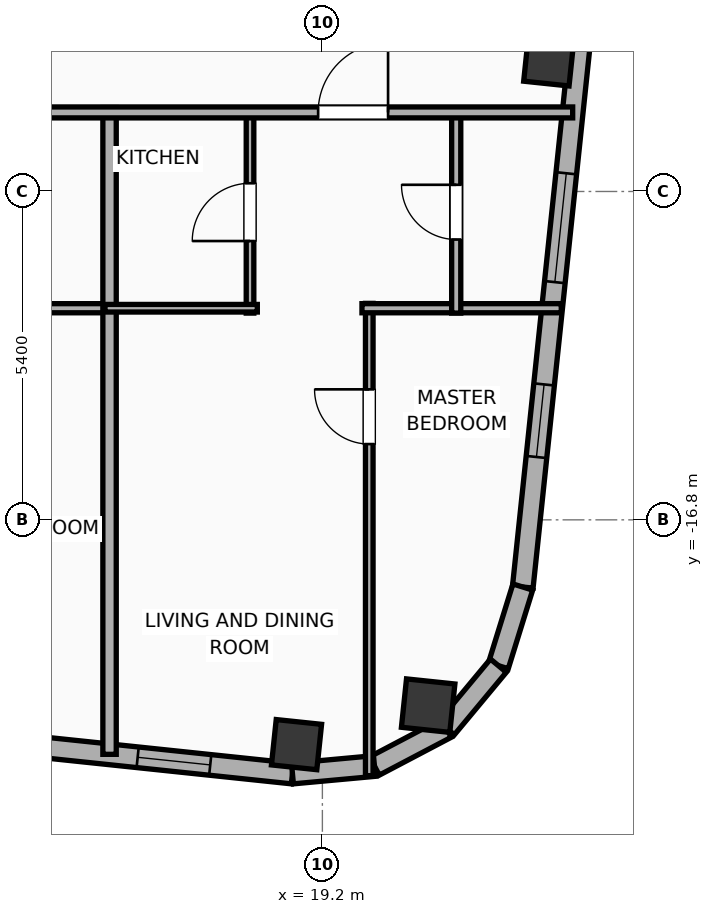
"""IFC4 building model, lengths in metres.
Left out: names, types, materials, properties, quantities, classifications, styles, units other than length and angle.
Written with IfcOpenShell. Run it as: python <this file> out.ifc"""

import sys

from ifc_helpers import new_model, si_unit, direction, frame, frame_2d, origin, origin_2d, place, context, subcontext, project, spatial, rectangle, hollow_rectangle, hollow_circle, extrude, element, fill, save


model = new_model("IFC4")
c1 = context("Model", 3, precision=1e-05, world=origin(), true_north=direction((0.0, 1.0)))
c2 = subcontext(c1, "Body", "Model", "MODEL_VIEW")
j1 = project(units=[si_unit("LENGTHUNIT", "METRE"), si_unit("PLANEANGLEUNIT", "RADIAN")], contexts=[c1])
p1 = place(None, origin())
s1 = spatial("IfcSite", under=j1, at=p1, CompositionType="ELEMENT")
p2 = place(p1, origin())
s2 = spatial("IfcBuilding", under=s1, at=p2, CompositionType="ELEMENT")
p3 = place(p2, frame((0.0, 0.0, 260.0)))
s3 = spatial("IfcBuildingStorey", under=s2, at=p3, CompositionType="ELEMENT", Elevation=260.0)
p4 = place(p3, frame((18.775, -20.497, 0.0), z_axis=(0.0, 0.0, 1.0), x_axis=(0.994521895368, -0.104528463268, 0.0)))
e1 = element("IfcColumn", 1, at=p4, inside=s3, PredefinedType="COLUMN", context=c2, shape_type="SweptSolid", body=[
    extrude(hollow_rectangle(XDim=0.75, YDim=0.75, WallThickness=0.025, at=origin_2d()), origin(), (0.0, 0.0, 1.0), 3.9),
])
p5 = place(p3, frame((20.939, -19.855, 0.0), z_axis=(0.0, 0.0, 1.0), x_axis=(0.994521895368, -0.104528463268, 0.0)))
e2 = element("IfcColumn", 2, at=p5, inside=s3, PredefinedType="COLUMN", context=c2, shape_type="SweptSolid", body=[
    extrude(hollow_circle(Radius=0.4, WallThickness=0.028, at=origin_2d()), origin(), (0.0, 0.0, 1.0), 3.9),
])
p6 = place(p3, frame((22.923, -9.252, 0.0), z_axis=(0.0, 0.0, 1.0), x_axis=(0.994521895368, -0.104528463268, 0.0)))
e3 = element("IfcColumn", 3, at=p6, inside=s3, PredefinedType="COLUMN", context=c2, shape_type="SweptSolid", body=[
    extrude(hollow_rectangle(XDim=0.75, YDim=0.75, WallThickness=0.025, at=origin_2d()), origin(), (0.0, 0.0, 1.0), 3.9),
])
p7 = place(p3, frame((18.708, -20.972, 0.0), z_axis=(0.0, 0.0, 1.0), x_axis=(-0.994521888554, 0.104528528102, 0.0)))
e4 = element("IfcWall", 4, at=p7, inside=s3, PredefinedType="ELEMENTEDWALL", context=c2, shape_type="SweptSolid", body=[
    extrude(rectangle(XDim=46.766, YDim=0.34, at=frame_2d((23.383, 0.0))), origin(), (0.0, 0.0, 1.0), 2.54),
])
p8 = place(p7, frame((23.833, 0.0, 0.75)))
e5 = element("IfcOpeningElement", 5, at=p8, cuts=e4, PredefinedType="OPENING", context=c2, shape_type="SweptSolid", body=[
    extrude(rectangle(XDim=2.4, YDim=1.63, at=frame_2d((1.2, 0.815))), frame((0.0, 0.18, 0.0), z_axis=(0.0, -1.0, 0.0), x_axis=(1.0, 0.0, 0.0)), (0.0, 0.0, 1.0), 0.36),
])
p9 = place(p7, frame((38.622, 0.0, 0.75)))
e6 = element("IfcOpeningElement", 6, at=p9, cuts=e4, PredefinedType="OPENING", context=c2, shape_type="SweptSolid", body=[
    extrude(rectangle(XDim=2.4, YDim=1.63, at=frame_2d((1.2, 0.815))), frame((0.0, 0.18, 0.0), z_axis=(0.0, -1.0, 0.0), x_axis=(1.0, 0.0, 0.0)), (0.0, 0.0, 1.0), 0.36),
])
p10 = place(p7, frame((44.402, 0.0, 0.75)))
e7 = element("IfcOpeningElement", 7, at=p10, cuts=e4, PredefinedType="OPENING", context=c2, shape_type="SweptSolid", body=[
    extrude(rectangle(XDim=1.2, YDim=1.63, at=frame_2d((0.6, 0.815))), frame((0.0, 0.18, 0.0), z_axis=(0.0, -1.0, 0.0), x_axis=(1.0, 0.0, 0.0)), (0.0, 0.0, 1.0), 0.36),
])
p11 = place(p7, frame((42.406, 0.0, 0.75)))
e8 = element("IfcOpeningElement", 8, at=p11, cuts=e4, PredefinedType="OPENING", context=c2, shape_type="SweptSolid", body=[
    extrude(rectangle(XDim=1.2, YDim=1.63, at=frame_2d((0.6, 0.815))), frame((0.0, 0.18, 0.0), z_axis=(0.0, -1.0, 0.0), x_axis=(1.0, 0.0, 0.0)), (0.0, 0.0, 1.0), 0.36),
])
p12 = place(p7, frame((34.933, 0.0, 0.75)))
e9 = element("IfcOpeningElement", 9, at=p12, cuts=e4, PredefinedType="OPENING", context=c2, shape_type="SweptSolid", body=[
    extrude(rectangle(XDim=1.2, YDim=1.63, at=frame_2d((0.6, 0.815))), frame((0.0, 0.18, 0.0), z_axis=(0.0, -1.0, 0.0), x_axis=(1.0, 0.0, 0.0)), (0.0, 0.0, 1.0), 0.36),
])
p13 = place(p7, frame((28.631, 0.0, 0.75)))
e10 = element("IfcOpeningElement", 10, at=p13, cuts=e4, PredefinedType="OPENING", context=c2, shape_type="SweptSolid", body=[
    extrude(rectangle(XDim=1.2, YDim=1.63, at=frame_2d((0.6, 0.815))), frame((0.0, 0.18, 0.0), z_axis=(0.0, -1.0, 0.0), x_axis=(1.0, 0.0, 0.0)), (0.0, 0.0, 1.0), 0.36),
])
p14 = place(p7, frame((30.896, 0.0, 0.75)))
e11 = element("IfcOpeningElement", 11, at=p14, cuts=e4, PredefinedType="OPENING", context=c2, shape_type="SweptSolid", body=[
    extrude(rectangle(XDim=1.2, YDim=1.63, at=frame_2d((0.6, 0.815))), frame((0.0, 0.18, 0.0), z_axis=(0.0, -1.0, 0.0), x_axis=(1.0, 0.0, 0.0)), (0.0, 0.0, 1.0), 0.36),
])
p15 = place(p7, frame((7.492, 0.0, 0.75)))
e12 = element("IfcOpeningElement", 12, at=p15, cuts=e4, PredefinedType="OPENING", context=c2, shape_type="SweptSolid", body=[
    extrude(rectangle(XDim=1.2, YDim=1.63, at=frame_2d((0.6, 0.815))), frame((0.0, 0.18, 0.0), z_axis=(0.0, -1.0, 0.0), x_axis=(1.0, 0.0, 0.0)), (0.0, 0.0, 1.0), 0.36),
])
p16 = place(p7, frame((4.141, 0.0, 0.75)))
e13 = element("IfcOpeningElement", 13, at=p16, cuts=e4, PredefinedType="OPENING", context=c2, shape_type="SweptSolid", body=[
    extrude(rectangle(XDim=1.2, YDim=1.63, at=frame_2d((0.6, 0.815))), frame((0.0, 0.18, 0.0), z_axis=(0.0, -1.0, 0.0), x_axis=(1.0, 0.0, 0.0)), (0.0, 0.0, 1.0), 0.36),
])
p17 = place(p7, frame((1.36, 0.0, 0.75)))
e14 = element("IfcOpeningElement", 14, at=p17, cuts=e4, PredefinedType="OPENING", context=c2, shape_type="SweptSolid", body=[
    extrude(rectangle(XDim=1.2, YDim=1.63, at=frame_2d((0.6, 0.815))), frame((0.0, 0.18, 0.0), z_axis=(0.0, -1.0, 0.0), x_axis=(1.0, 0.0, 0.0)), (0.0, 0.0, 1.0), 0.36),
])
p18 = place(p7, frame((20.254, 0.0, 0.75)))
e15 = element("IfcOpeningElement", 15, at=p18, cuts=e4, PredefinedType="OPENING", context=c2, shape_type="SweptSolid", body=[
    extrude(rectangle(XDim=1.2, YDim=1.63, at=frame_2d((0.6, 0.815))), frame((0.0, 0.18, 0.0), z_axis=(0.0, -1.0, 0.0), x_axis=(1.0, 0.0, 0.0)), (0.0, 0.0, 1.0), 0.36),
])
p19 = place(p7, frame((16.172, 0.0, 0.75)))
e16 = element("IfcOpeningElement", 16, at=p19, cuts=e4, PredefinedType="OPENING", context=c2, shape_type="SweptSolid", body=[
    extrude(rectangle(XDim=1.2, YDim=1.63, at=frame_2d((0.6, 0.815))), frame((0.0, 0.18, 0.0), z_axis=(0.0, -1.0, 0.0), x_axis=(1.0, 0.0, 0.0)), (0.0, 0.0, 1.0), 0.36),
])
p20 = place(p7, frame((12.11, 0.0, 0.75)))
e17 = element("IfcOpeningElement", 17, at=p20, cuts=e4, PredefinedType="OPENING", context=c2, shape_type="SweptSolid", body=[
    extrude(rectangle(XDim=1.2, YDim=1.63, at=frame_2d((0.6, 0.815))), frame((0.0, 0.18, 0.0), z_axis=(0.0, -1.0, 0.0), x_axis=(1.0, 0.0, 0.0)), (0.0, 0.0, 1.0), 0.36),
])
p21 = place(p3, frame((25.67, 12.296, 0.0), z_axis=(0.0, 0.0, 1.0), x_axis=(-0.104533282919, -0.994521388791, 0.0)))
e18 = element("IfcWall", 18, at=p21, inside=s3, PredefinedType="ELEMENTEDWALL", context=c2, shape_type="SweptSolid", body=[
    extrude(rectangle(XDim=30.366, YDim=0.34, at=frame_2d((15.183, 0.0))), origin(), (0.0, 0.0, 1.0), 2.54),
])
p22 = place(p21, frame((5.842, 0.0, 0.75)))
e19 = element("IfcOpeningElement", 19, at=p22, cuts=e18, PredefinedType="OPENING", context=c2, shape_type="SweptSolid", body=[
    extrude(rectangle(XDim=1.8, YDim=1.63, at=frame_2d((0.9, 0.815))), frame((0.0, 0.18, 0.0), z_axis=(0.0, -1.0, 0.0), x_axis=(1.0, 0.0, 0.0)), (0.0, 0.0, 1.0), 0.36),
])
p23 = place(p21, frame((23.525, 0.0, 0.75)))
e20 = element("IfcOpeningElement", 20, at=p23, cuts=e18, PredefinedType="OPENING", context=c2, shape_type="SweptSolid", body=[
    extrude(rectangle(XDim=1.8, YDim=1.63, at=frame_2d((0.9, 0.815))), frame((0.0, 0.18, 0.0), z_axis=(0.0, -1.0, 0.0), x_axis=(1.0, 0.0, 0.0)), (0.0, 0.0, 1.0), 0.36),
])
p24 = place(p21, frame((27.017, 0.0, 0.75)))
e21 = element("IfcOpeningElement", 21, at=p24, cuts=e18, PredefinedType="OPENING", context=c2, shape_type="SweptSolid", body=[
    extrude(rectangle(XDim=1.2, YDim=1.63, at=frame_2d((0.6, 0.815))), frame((0.0, 0.18, 0.0), z_axis=(0.0, -1.0, 0.0), x_axis=(1.0, 0.0, 0.0)), (0.0, 0.0, 1.0), 0.36),
])
p25 = place(p21, frame((17.829, 0.0, 0.75)))
e22 = element("IfcOpeningElement", 22, at=p25, cuts=e18, PredefinedType="OPENING", context=c2, shape_type="SweptSolid", body=[
    extrude(rectangle(XDim=1.2, YDim=1.63, at=frame_2d((0.6, 0.815))), frame((0.0, 0.18, 0.0), z_axis=(0.0, -1.0, 0.0), x_axis=(1.0, 0.0, 0.0)), (0.0, 0.0, 1.0), 0.36),
])
p26 = place(p3, frame((22.496, -17.905, 0.0), z_axis=(0.0, 0.0, 1.0), x_axis=(-0.296416228123, -0.955058856671, 0.0)))
e23 = element("IfcWall", 23, at=p26, inside=s3, PredefinedType="ELEMENTEDWALL", context=c2, shape_type="SweptSolid", body=[
    extrude(rectangle(XDim=1.354, YDim=0.34, at=frame_2d((0.677, 0.0))), origin(), (0.0, 0.0, 1.0), 3.65),
])
p27 = place(p3, frame((22.094, -19.198, 0.0), z_axis=(0.0, 0.0, 1.0), x_axis=(-0.639501603217, -0.768789762863, 0.0)))
e24 = element("IfcWall", 24, at=p27, inside=s3, PredefinedType="ELEMENTEDWALL", context=c2, shape_type="SweptSolid", body=[
    extrude(rectangle(XDim=1.337, YDim=0.34, at=frame_2d((0.668, 0.0))), origin(), (0.0, 0.0, 1.0), 3.65),
])
p28 = place(p3, frame((21.24, -20.226, 0.0), z_axis=(0.0, 0.0, 1.0), x_axis=(-0.884922182678, -0.465738908193, 0.0)))
e25 = element("IfcWall", 25, at=p28, inside=s3, PredefinedType="ELEMENTEDWALL", context=c2, shape_type="SweptSolid", body=[
    extrude(rectangle(XDim=1.337, YDim=0.34, at=frame_2d((0.668, 0.0))), origin(), (0.0, 0.0, 1.0), 2.54),
])
p29 = place(p3, frame((20.056, -20.848, 0.0), z_axis=(0.0, 0.0, 1.0), x_axis=(-0.995813013343, -0.091413579172, 0.0)))
e26 = element("IfcWall", 26, at=p29, inside=s3, PredefinedType="ELEMENTEDWALL", context=c2, shape_type="SweptSolid", body=[
    extrude(rectangle(XDim=1.354, YDim=0.34, at=frame_2d((0.677, 0.0))), origin(), (0.0, 0.0, 1.0), 2.54),
])
p30 = place(p3, frame((12.17, -13.32, 0.0), z_axis=(0.0, 0.0, 1.0), x_axis=(1.0, 0.0, 0.0)))
e27 = element("IfcWall", 27, at=p30, inside=s3, PredefinedType="PLUMBINGWALL", context=c2, shape_type="SweptSolid", body=[
    extrude(rectangle(XDim=3.605, YDim=0.15, at=frame_2d((1.802, 0.0))), origin(), (0.0, 0.0, 1.0), 3.65),
])
p31 = place(p3, frame((15.7, -20.656, 0.0), z_axis=(0.0, 0.0, 1.0), x_axis=(0.0, 1.0, 0.0)))
e28 = element("IfcWall", 28, at=p31, inside=s3, PredefinedType="PARTITIONING", context=c2, shape_type="SweptSolid", body=[
    extrude(rectangle(XDim=10.636, YDim=0.22, at=frame_2d((5.318, 0.0))), origin(), (0.0, 0.0, 1.0), 3.65),
])
p32 = place(p3, frame((19.971, -21.007, 0.0), z_axis=(0.0, 0.0, 1.0), x_axis=(0.0, 1.0, 0.0)))
e29 = element("IfcWall", 29, at=p32, inside=s3, PredefinedType="PARTITIONING", context=c2, shape_type="SweptSolid", body=[
    extrude(rectangle(XDim=7.767, YDim=0.125, at=frame_2d((3.883, 0.0))), origin(), (0.0, 0.0, 1.0), 3.65),
])
p33 = place(p32, frame((5.453, 0.0, 0.0)))
e30 = element("IfcOpeningElement", 30, at=p33, cuts=e29, PredefinedType="OPENING", context=c2, shape_type="SweptSolid", body=[
    extrude(rectangle(XDim=0.9, YDim=2.05, at=frame_2d((0.45, 1.025))), frame((0.0, 0.073, 0.0), z_axis=(0.0, -1.0, 0.0), x_axis=(1.0, 0.0, 0.0)), (0.0, 0.0, 1.0), 0.145),
])
p34 = place(p3, frame((19.851, -13.32, 0.0), z_axis=(0.0, 0.0, 1.0), x_axis=(1.0, 0.0, 0.0)))
e31 = element("IfcWall", 31, at=p34, inside=s3, PredefinedType="PLUMBINGWALL", context=c2, shape_type="SweptSolid", body=[
    extrude(rectangle(XDim=3.278, YDim=0.15, at=frame_2d((1.639, 0.0))), origin(), (0.0, 0.0, 1.0), 3.65),
])
p35 = place(p3, frame((18.01, -13.4, 0.0), z_axis=(0.0, 0.0, 1.0), x_axis=(0.0, 1.0, 0.0)))
e32 = element("IfcWall", 32, at=p35, inside=s3, PredefinedType="PARTITIONING", context=c2, shape_type="SweptSolid", body=[
    extrude(rectangle(XDim=3.32, YDim=0.125, at=frame_2d((1.66, 0.0))), origin(), (0.0, 0.0, 1.0), 3.65),
])
p36 = place(p35, frame((1.185, 0.0, 0.0)))
e33 = element("IfcOpeningElement", 33, at=p36, cuts=e32, PredefinedType="OPENING", context=c2, shape_type="SweptSolid", body=[
    extrude(rectangle(XDim=0.95, YDim=2.05, at=frame_2d((0.475, 1.025))), frame((0.0, 0.073, 0.0), z_axis=(0.0, -1.0, 0.0), x_axis=(1.0, 0.0, 0.0)), (0.0, 0.0, 1.0), 0.145),
])
p37 = place(p3, frame((15.625, -13.32, 0.0), z_axis=(0.0, 0.0, 1.0), x_axis=(1.0, 0.0, 0.0)))
e34 = element("IfcWall", 34, at=p37, inside=s3, PredefinedType="PARTITIONING", context=c2, shape_type="SweptSolid", body=[
    extrude(rectangle(XDim=2.505, YDim=0.125, at=frame_2d((1.252, 0.0))), origin(), (0.0, 0.0, 1.0), 3.65),
])
p38 = place(p3, frame((21.401, -13.4, 0.0), z_axis=(0.0, 0.0, 1.0), x_axis=(0.0, 1.0, 0.0)))
e35 = element("IfcWall", 35, at=p38, inside=s3, PredefinedType="PLUMBINGWALL", context=c2, shape_type="SweptSolid", body=[
    extrude(rectangle(XDim=3.32, YDim=0.15, at=frame_2d((1.66, 0.0))), origin(), (0.0, 0.0, 1.0), 3.65),
])
p39 = place(p38, frame((1.21, 0.0, 0.0)))
e36 = element("IfcOpeningElement", 36, at=p39, cuts=e35, PredefinedType="OPENING", context=c2, shape_type="SweptSolid", body=[
    extrude(rectangle(XDim=0.9, YDim=2.05, at=frame_2d((0.45, 1.025))), frame((0.0, 0.085, 0.0), z_axis=(0.0, -1.0, 0.0), x_axis=(1.0, 0.0, 0.0)), (0.0, 0.0, 1.0), 0.17),
])
p40 = place(p3, frame((8.08, -10.1, 0.0), z_axis=(0.0, 0.0, 1.0), x_axis=(1.0, 0.0, 0.0)))
e37 = element("IfcWall", 37, at=p40, inside=s3, PredefinedType="PARTITIONING", context=c2, shape_type="SweptSolid", body=[
    extrude(rectangle(XDim=15.236, YDim=0.18, at=frame_2d((7.618, 0.0))), origin(), (0.0, 0.0, 1.0), 3.65),
])
p41 = place(p40, frame((3.4, 0.0, 0.0)))
e38 = element("IfcOpeningElement", 38, at=p41, cuts=e37, PredefinedType="OPENING", context=c2, shape_type="SweptSolid", body=[
    extrude(rectangle(XDim=1.15, YDim=2.05, at=frame_2d((0.575, 1.025))), frame((0.0, 0.1, 0.0), z_axis=(0.0, -1.0, 0.0), x_axis=(1.0, 0.0, 0.0)), (0.0, 0.0, 1.0), 0.2),
])
p42 = place(p40, frame((11.05, 0.0, 0.0)))
e39 = element("IfcOpeningElement", 39, at=p42, cuts=e37, PredefinedType="OPENING", context=c2, shape_type="SweptSolid", body=[
    extrude(rectangle(XDim=1.15, YDim=2.05, at=frame_2d((0.575, 1.025))), frame((0.0, 0.1, 0.0), z_axis=(0.0, -1.0, 0.0), x_axis=(1.0, 0.0, 0.0)), (0.0, 0.0, 1.0), 0.2),
])
p43 = place(p23, origin())
e40 = element("IfcWindow", 40, at=p43, inside=s3, PartitioningType="SINGLE_PANEL", PredefinedType="WINDOW", context=c2, shape_type="SweptSolid", body=[
    extrude(rectangle(XDim=1.8, YDim=1.63, at=frame_2d((0.9, 0.815))), frame((0.0, 0.03, 0.0), z_axis=(0.0, -1.0, 0.0), x_axis=(1.0, 0.0, 0.0)), (0.0, 0.0, 1.0), 0.06),
])
fill(e20, e40)
p44 = place(p17, origin())
e41 = element("IfcWindow", 41, at=p44, inside=s3, PartitioningType="SINGLE_PANEL", PredefinedType="WINDOW", context=c2, shape_type="SweptSolid", body=[
    extrude(rectangle(XDim=1.2, YDim=1.63, at=frame_2d((0.6, 0.815))), frame((0.0, 0.03, 0.0), z_axis=(0.0, -1.0, 0.0), x_axis=(1.0, 0.0, 0.0)), (0.0, 0.0, 1.0), 0.06),
])
fill(e14, e41)
p45 = place(p24, origin())
e42 = element("IfcWindow", 42, at=p45, inside=s3, PartitioningType="SINGLE_PANEL", PredefinedType="WINDOW", context=c2, shape_type="SweptSolid", body=[
    extrude(rectangle(XDim=1.2, YDim=1.63, at=frame_2d((0.6, 0.815))), frame((0.0, 0.03, 0.0), z_axis=(0.0, -1.0, 0.0), x_axis=(1.0, 0.0, 0.0)), (0.0, 0.0, 1.0), 0.06),
])
fill(e21, e42)
p46 = place(p33, origin())
e43 = element("IfcDoor", 43, at=p46, inside=s3, OperationType="SINGLE_SWING_RIGHT", PredefinedType="DOOR", context=c2, shape_type="SweptSolid", body=[
    extrude(rectangle(XDim=0.9, YDim=2.05, at=frame_2d((0.45, 1.025))), frame((0.0, 0.025, 0.0), z_axis=(0.0, -1.0, 0.0), x_axis=(1.0, 0.0, 0.0)), (0.0, 0.0, 1.0), 0.05),
])
fill(e30, e43)
p47 = place(p36, origin())
e44 = element("IfcDoor", 44, at=p47, inside=s3, OperationType="SINGLE_SWING_LEFT", PredefinedType="DOOR", context=c2, shape_type="SweptSolid", body=[
    extrude(rectangle(XDim=0.95, YDim=2.05, at=frame_2d((0.475, 1.025))), frame((0.0, 0.025, 0.0), z_axis=(0.0, -1.0, 0.0), x_axis=(1.0, 0.0, 0.0)), (0.0, 0.0, 1.0), 0.05),
])
fill(e33, e44)
p48 = place(p39, origin())
e45 = element("IfcDoor", 45, at=p48, inside=s3, OperationType="SINGLE_SWING_RIGHT", PredefinedType="DOOR", context=c2, shape_type="SweptSolid", body=[
    extrude(rectangle(XDim=0.9, YDim=2.05, at=frame_2d((0.45, 1.025))), frame((0.0, 0.025, 0.0), z_axis=(0.0, -1.0, 0.0), x_axis=(1.0, 0.0, 0.0)), (0.0, 0.0, 1.0), 0.05),
])
fill(e36, e45)
p49 = place(p42, origin())
e46 = element("IfcDoor", 46, at=p49, inside=s3, OperationType="SINGLE_SWING_RIGHT", PredefinedType="DOOR", context=c2, shape_type="SweptSolid", body=[
    extrude(rectangle(XDim=1.15, YDim=2.05, at=frame_2d((0.575, 1.025))), frame((0.0, 0.025, 0.0), z_axis=(0.0, -1.0, 0.0), x_axis=(1.0, 0.0, 0.0)), (0.0, 0.0, 1.0), 0.05),
])
fill(e39, e46)
save(model, sys.argv[1])
